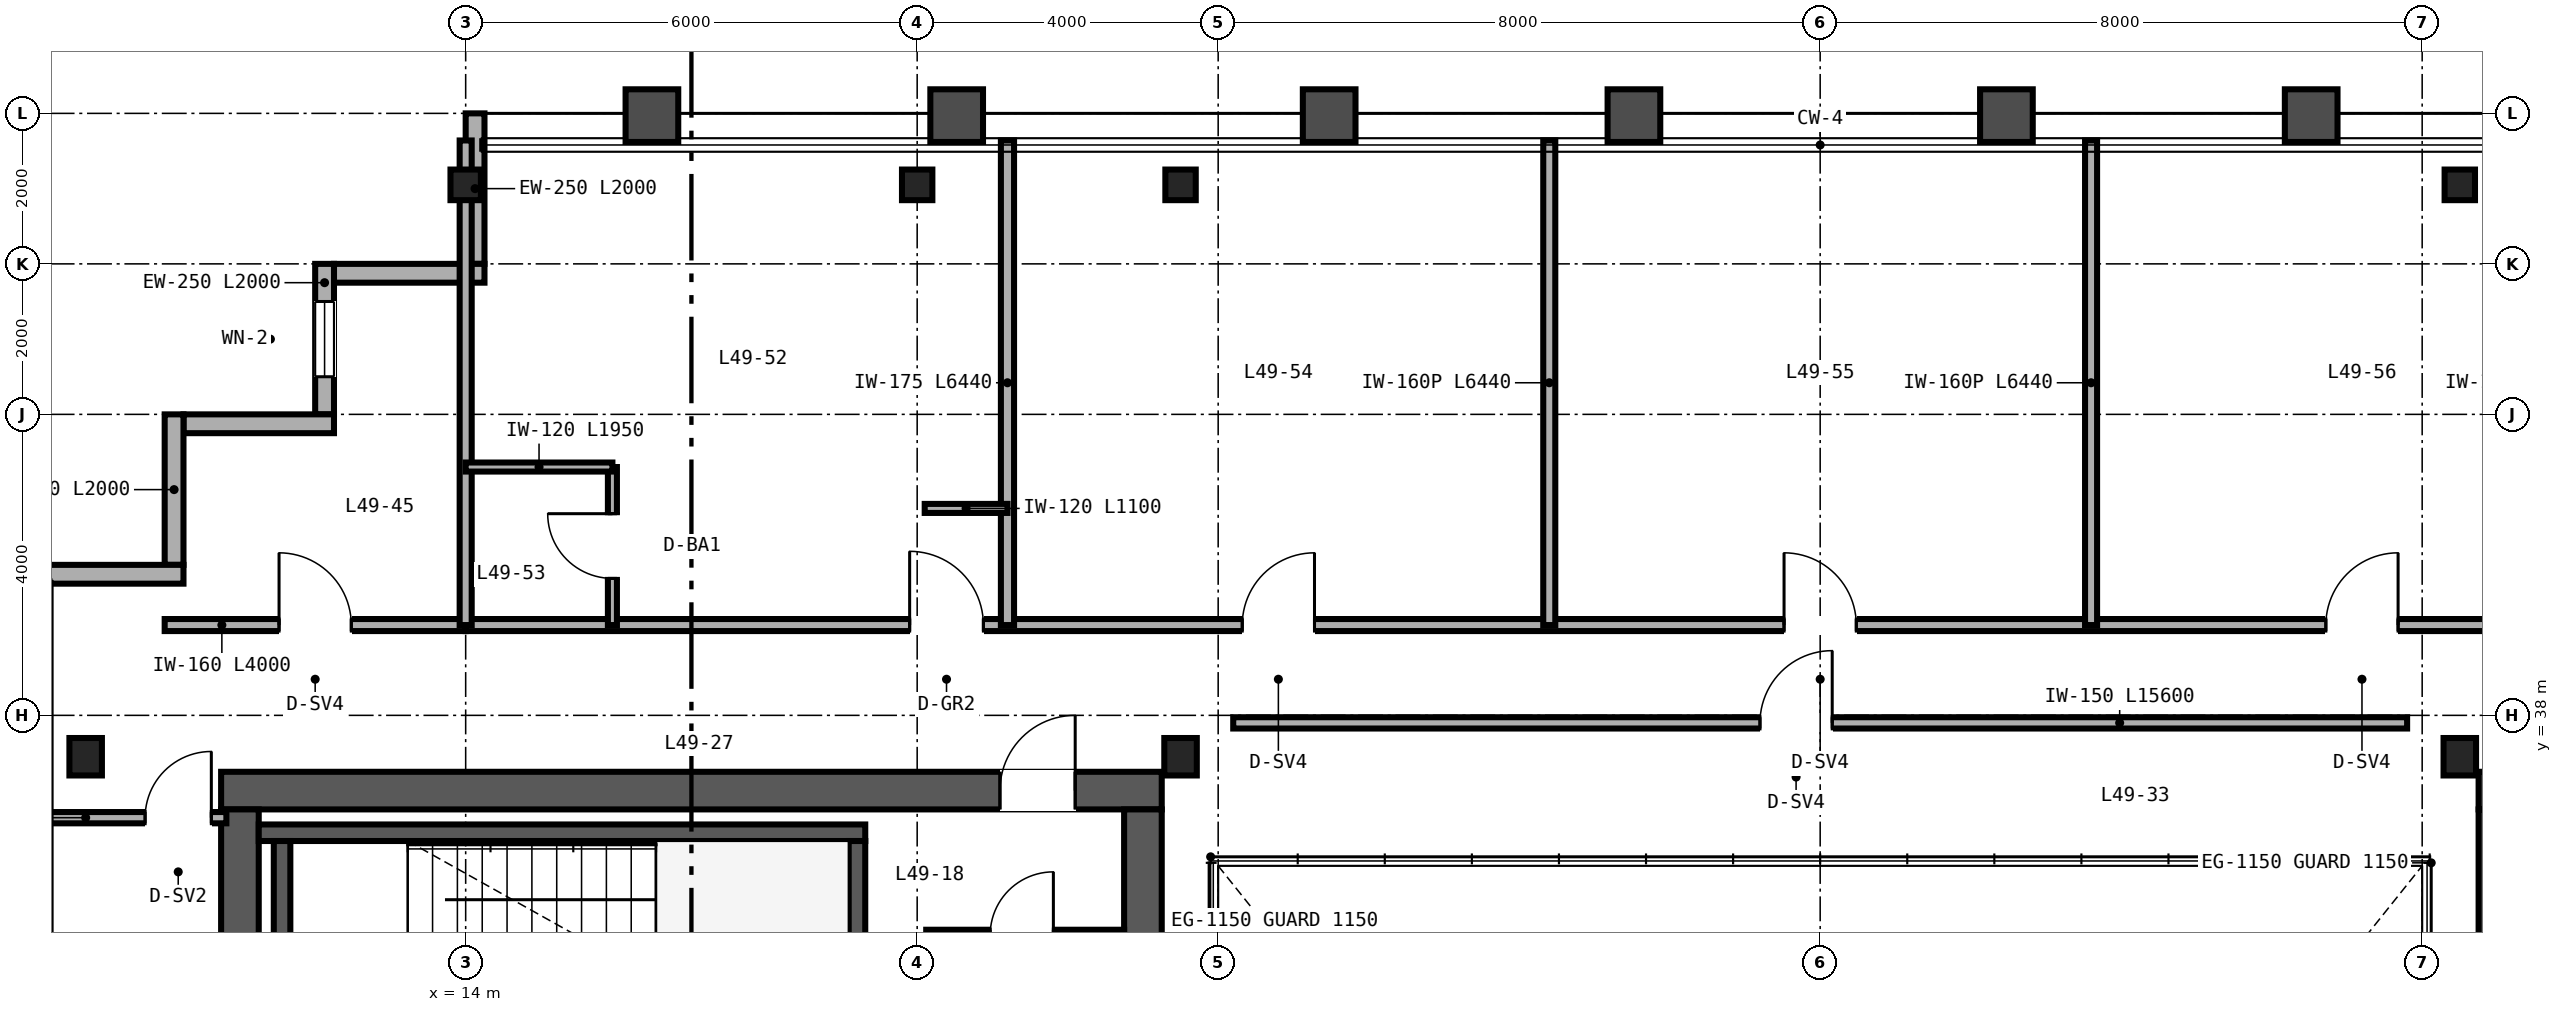
"""IFC4 building model, lengths in metres.
Left out: names, types, materials, properties, quantities, classifications, styles, units other than length and angle.
Written with IfcOpenShell. Run it as: python <this file> out.ifc"""

import sys

from ifc_helpers import new_model, si_unit, direction, frame, frame_2d, origin, origin_2d, place, context, subcontext, project, spatial, rectangle, i_section, extrude, source, transform, mapped, element, fill, save


model = new_model("IFC4")
c1 = context("Model", 3, precision=1e-05, world=origin(), true_north=direction((0.0, 1.0)))
c2 = subcontext(c1, "Body", "Model", "MODEL_VIEW")
j1 = project(units=[si_unit("LENGTHUNIT", "METRE"), si_unit("PLANEANGLEUNIT", "RADIAN")], contexts=[c1])
p1 = place(None, origin())
s1 = spatial("IfcSite", under=j1, at=p1, CompositionType="ELEMENT")
p2 = place(p1, origin())
s2 = spatial("IfcBuilding", under=s1, at=p2, CompositionType="ELEMENT")
p3 = place(p2, frame((0.0, 0.0, 195.6)))
s3 = spatial("IfcBuildingStorey", under=s2, at=p3, CompositionType="ELEMENT", Elevation=195.6)
p4 = place(p3, frame((10.75, 37.0, 0.0), z_axis=(0.0, 0.0, 1.0), x_axis=(1.0, 0.0, 0.0)))
e1 = element("IfcWall", 1, at=p4, inside=s3, PredefinedType="SHEAR", context=c2, shape_type="SweptSolid", body=[
    extrude(rectangle(XDim=12.5, YDim=0.5, at=frame_2d((6.25, 0.0))), origin(), (0.0, 0.0, 1.0), 3.37),
])
p5 = place(p4, frame((10.35, 0.0, 0.0)))
e2 = element("IfcOpeningElement", 2, at=p5, cuts=e1, PredefinedType="OPENING", context=c2, shape_type="SweptSolid", body=[
    extrude(rectangle(XDim=1.0, YDim=2.15, at=frame_2d((0.5, 1.075))), frame((0.0, 0.26, 0.0), z_axis=(0.0, -1.0, 0.0), x_axis=(1.0, 0.0, 0.0)), (0.0, 0.0, 1.0), 0.52),
])
for number, where, z_axis, x_axis in (
    (3, (11.0, 15.25, 0.0), (0.0, 0.0, 1.0), (0.0, 1.0, 0.0)),
    (4, (23.0, 15.25, 0.0), (0.0, 0.0, 1.0), (0.0, 1.0, 0.0)),
):
    element("IfcWall", number, at=place(p3, frame(where, z_axis=z_axis, x_axis=x_axis)), inside=s3, PredefinedType="SHEAR", context=c2, shape_type="SweptSolid", body=[
        extrude(rectangle(XDim=21.5, YDim=0.5, at=frame_2d((10.75, 0.0))), origin(), (0.0, 0.0, 1.0), 3.37),
    ])
p6 = place(p3, frame((40.75, 37.0, 0.0), z_axis=(0.0, 0.0, 1.0), x_axis=(1.0, 0.0, 0.0)))
e5 = element("IfcWall", 5, at=p6, inside=s3, PredefinedType="SHEAR", context=c2, shape_type="SweptSolid", body=[
    extrude(rectangle(XDim=12.5, YDim=0.5, at=frame_2d((6.25, 0.0))), origin(), (0.0, 0.0, 1.0), 3.37),
])
p7 = place(p6, frame((9.95, 0.0, 0.0)))
e6 = element("IfcOpeningElement", 6, at=p7, cuts=e5, PredefinedType="OPENING", context=c2, shape_type="SweptSolid", body=[
    extrude(rectangle(XDim=1.1, YDim=2.15, at=frame_2d((0.55, 1.075))), frame((0.0, 0.26, 0.0), z_axis=(0.0, -1.0, 0.0), x_axis=(1.0, 0.0, 0.0)), (0.0, 0.0, 1.0), 0.52),
])
p8 = place(p3, frame((41.0, 15.25, 0.0), z_axis=(0.0, 0.0, 1.0), x_axis=(0.0, 1.0, 0.0)))
e7 = element("IfcWall", 7, at=p8, inside=s3, PredefinedType="SHEAR", context=c2, shape_type="SweptSolid", body=[
    extrude(rectangle(XDim=21.5, YDim=0.5, at=frame_2d((10.75, 0.0))), origin(), (0.0, 0.0, 1.0), 3.37),
])
p9 = place(p3, frame((11.25, 36.44, 0.0), z_axis=(0.0, 0.0, 1.0), x_axis=(1.0, 0.0, 0.0)))
e8 = element("IfcWall", 8, at=p9, inside=s3, PredefinedType="SHEAR", context=c2, shape_type="SweptSolid", body=[
    extrude(rectangle(XDim=8.06, YDim=0.22, at=frame_2d((4.03, 0.0))), origin(), (0.0, 0.0, 1.0), 3.4),
])
for number, where, z_axis, x_axis in (
    (9, (11.56, 33.05, 0.0), (0.0, 0.0, 1.0), (0.0, 1.0, 0.0)),
    (10, (19.2, 33.05, 0.0), (0.0, 0.0, 1.0), (0.0, 1.0, 0.0)),
):
    element("IfcWall", number, at=place(p3, frame(where, z_axis=z_axis, x_axis=x_axis)), inside=s3, PredefinedType="SHEAR", context=c2, shape_type="SweptSolid", body=[
        extrude(rectangle(XDim=3.28, YDim=0.22, at=frame_2d((1.64, 0.0))), origin(), (0.0, 0.0, 1.0), 3.4),
    ])
m1 = source(origin(), c2, "Body", "SweptSolid", [
    extrude(i_section(OverallWidth=0.432, OverallDepth=0.498, WebThickness=0.056, FlangeThickness=0.089, FilletRadius=0.025, at=origin_2d()), origin(), (0.0, 0.0, 1.0), 3.37),
])
for number, where, z_axis, x_axis in (
    (11, (8.95, 37.45, 0.0), (0.0, 0.0, 1.0), (1.0, 0.0, 0.0)),
    (12, (23.5, 37.45, 0.0), (0.0, 0.0, 1.0), (1.0, 0.0, 0.0)),
    (13, (40.5, 37.45, 0.0), (0.0, 0.0, 1.0), (1.0, 0.0, 0.0)),
):
    element("IfcColumn", number, at=place(p3, frame(where, z_axis=z_axis, x_axis=x_axis)), inside=s3, PredefinedType="COLUMN", context=c2, shape_type="MappedRepresentation", body=[
        mapped(m1, transform((0.0, 0.0, 0.0), scale=1.0)),
    ])
m2 = source(origin(), c2, "Body", "SweptSolid", [
    extrude(i_section(OverallWidth=0.404, OverallDepth=0.407, WebThickness=0.027, FlangeThickness=0.044, FilletRadius=0.025, at=origin_2d()), origin(), (0.0, 0.0, 1.0), 3.37),
])
for number, where, z_axis, x_axis in (
    (14, (14.0, 45.05, 0.0), (0.0, 0.0, 1.0), (1.0, 0.0, 0.0)),
    (15, (20.0, 45.05, 0.0), (0.0, 0.0, 1.0), (1.0, 0.0, 0.0)),
    (16, (23.5, 45.05, 0.0), (0.0, 0.0, 1.0), (1.0, 0.0, 0.0)),
    (17, (40.5, 45.05, 0.0), (0.0, 0.0, 1.0), (1.0, 0.0, 0.0)),
):
    element("IfcColumn", number, at=place(p3, frame(where, z_axis=z_axis, x_axis=x_axis)), inside=s3, PredefinedType="COLUMN", context=c2, shape_type="MappedRepresentation", body=[
        mapped(m2, transform((0.0, 0.0, 0.0), scale=1.0)),
    ])
p10 = place(p3, frame((14.125, 46.0, 0.0), z_axis=(0.0, 0.0, 1.0), x_axis=(0.0, -1.0, 0.0)))
e18 = element("IfcWall", 18, at=p10, inside=s3, PredefinedType="SOLIDWALL", context=c2, shape_type="SweptSolid", body=[
    extrude(rectangle(XDim=2.0, YDim=0.25, at=frame_2d((1.0, 0.0))), origin(), (0.0, 0.0, 1.0), 2.677),
])
p11 = place(p3, frame((14.25, 43.875, 0.0), z_axis=(0.0, 0.0, 1.0), x_axis=(-1.0, 0.0, 0.0)))
e19 = element("IfcWall", 19, at=p11, inside=s3, PredefinedType="SOLIDWALL", context=c2, shape_type="SweptSolid", body=[
    extrude(rectangle(XDim=2.0, YDim=0.25, at=frame_2d((1.0, 0.0))), origin(), (0.0, 0.0, 1.0), 3.37),
])
p12 = place(p3, frame((12.125, 44.0, 0.0), z_axis=(0.0, 0.0, 1.0), x_axis=(0.0, -1.0, 0.0)))
e20 = element("IfcWall", 20, at=p12, inside=s3, PredefinedType="SOLIDWALL", context=c2, shape_type="SweptSolid", body=[
    extrude(rectangle(XDim=2.0, YDim=0.25, at=frame_2d((1.0, 0.0))), origin(), (0.0, 0.0, 1.0), 3.37),
])
p13 = place(p12, frame((0.5, 0.0, 0.85)))
e21 = element("IfcOpeningElement", 21, at=p13, cuts=e20, PredefinedType="OPENING", context=c2, shape_type="SweptSolid", body=[
    extrude(rectangle(XDim=1.0, YDim=1.9, at=frame_2d((0.5, 0.95))), frame((0.0, 0.135, 0.0), z_axis=(0.0, -1.0, 0.0), x_axis=(1.0, 0.0, 0.0)), (0.0, 0.0, 1.0), 0.27),
])
for number, where, z_axis, x_axis in (
    (22, (12.25, 41.875, 0.0), (0.0, 0.0, 1.0), (-1.0, 0.0, 0.0)),
    (23, (10.125, 42.0, 0.0), (0.0, 0.0, 1.0), (0.0, -1.0, 0.0)),
):
    element("IfcWall", number, at=place(p3, frame(where, z_axis=z_axis, x_axis=x_axis)), inside=s3, PredefinedType="SOLIDWALL", context=c2, shape_type="SweptSolid", body=[
        extrude(rectangle(XDim=2.0, YDim=0.25, at=frame_2d((1.0, 0.0))), origin(), (0.0, 0.0, 1.0), 3.37),
    ])
p14 = place(p3, frame((10.25, 39.875, 0.0), z_axis=(0.0, 0.0, 1.0), x_axis=(-1.0, 0.0, 0.0)))
e24 = element("IfcWall", 24, at=p14, inside=s3, PredefinedType="SOLIDWALL", context=c2, shape_type="SweptSolid", body=[
    extrude(rectangle(XDim=2.25, YDim=0.25, at=frame_2d((1.125, 0.0))), origin(), (0.0, 0.0, 1.0), 3.37),
])
p15 = place(p3, frame((20.12, 35.08, 0.0), z_axis=(0.0, 0.0, 1.0), x_axis=(1.0, 0.0, 0.0)))
e25 = element("IfcWall", 25, at=p15, inside=s3, PredefinedType="PARTITIONING", context=c2, shape_type="SweptSolid", body=[
    extrude(rectangle(XDim=2.63, YDim=0.142, at=frame_2d((1.315, 0.0))), origin(), (0.0, 0.0, 1.0), 3.37),
])
p16 = place(p15, frame((0.85, 0.0, 0.0)))
e26 = element("IfcOpeningElement", 26, at=p16, cuts=e25, PredefinedType="OPENING", context=c2, shape_type="SweptSolid", body=[
    extrude(rectangle(XDim=0.84, YDim=2.1, at=frame_2d((0.42, 1.05))), frame((0.0, 0.081, 0.0), z_axis=(0.0, -1.0, 0.0), x_axis=(1.0, 0.0, 0.0)), (0.0, 0.0, 1.0), 0.162),
])
p17 = place(p3, frame((24.2, 37.9, 0.0), z_axis=(0.0, 0.0, 1.0), x_axis=(1.0, 0.0, 0.0)))
e27 = element("IfcWall", 27, at=p17, inside=s3, PredefinedType="PARTITIONING", context=c2, shape_type="SweptSolid", body=[
    extrude(rectangle(XDim=15.6, YDim=0.15, at=frame_2d((7.8, 0.0))), origin(), (0.0, 0.0, 1.0), 3.37),
])
p18 = place(p17, frame((7.0, 0.0, 0.0)))
e28 = element("IfcOpeningElement", 28, at=p18, cuts=e27, PredefinedType="OPENING", context=c2, shape_type="SweptSolid", body=[
    extrude(rectangle(XDim=0.96, YDim=2.15, at=frame_2d((0.48, 1.075))), frame((0.0, 0.085, 0.0), z_axis=(0.0, -1.0, 0.0), x_axis=(1.0, 0.0, 0.0)), (0.0, 0.0, 1.0), 0.17),
])
p19 = place(p3, frame((8.16, 36.64, 0.0), z_axis=(0.0, 0.0, 1.0), x_axis=(1.0, 0.0, 0.0)))
e29 = element("IfcWall", 29, at=p19, inside=s3, PredefinedType="PARTITIONING", context=c2, shape_type="SweptSolid", body=[
    extrude(rectangle(XDim=2.66, YDim=0.15, at=frame_2d((1.33, 0.0))), origin(), (0.0, 0.0, 1.0), 2.753),
])
p20 = place(p19, frame((1.58, 0.0, 0.0)))
e30 = element("IfcOpeningElement", 30, at=p20, cuts=e29, PredefinedType="OPENING", context=c2, shape_type="SweptSolid", body=[
    extrude(rectangle(XDim=0.88, YDim=2.15, at=frame_2d((0.44, 1.075))), frame((0.0, 0.085, 0.0), z_axis=(0.0, -1.0, 0.0), x_axis=(1.0, 0.0, 0.0)), (0.0, 0.0, 1.0), 0.17),
])
p21 = place(p3, frame((10.0, 39.2, 0.0), z_axis=(0.0, 0.0, 1.0), x_axis=(1.0, 0.0, 0.0)))
e31 = element("IfcWall", 31, at=p21, inside=s3, PredefinedType="PARTITIONING", context=c2, shape_type="SweptSolid", body=[
    extrude(rectangle(XDim=4.0, YDim=0.16, at=frame_2d((2.0, 0.0))), origin(), (0.0, 0.0, 1.0), 3.37),
])
p22 = place(p21, frame((1.52, 0.0, 0.0)))
e32 = element("IfcOpeningElement", 32, at=p22, cuts=e31, PredefinedType="OPENING", context=c2, shape_type="SweptSolid", body=[
    extrude(rectangle(XDim=0.96, YDim=2.15, at=frame_2d((0.48, 1.075))), frame((0.0, 0.09, 0.0), z_axis=(0.0, -1.0, 0.0), x_axis=(1.0, 0.0, 0.0)), (0.0, 0.0, 1.0), 0.18),
])
p23 = place(p3, frame((14.0, 39.2, 0.0), z_axis=(0.0, 0.0, 1.0), x_axis=(1.0, 0.0, 0.0)))
e33 = element("IfcWall", 33, at=p23, inside=s3, PredefinedType="PARTITIONING", context=c2, shape_type="SweptSolid", body=[
    extrude(rectangle(XDim=36.0, YDim=0.16, at=frame_2d((18.0, 0.0))), origin(), (0.0, 0.0, 1.0), 2.913),
])
p24 = place(p23, frame((5.9, 0.0, 0.0)))
e34 = element("IfcOpeningElement", 34, at=p24, cuts=e33, PredefinedType="OPENING", context=c2, shape_type="SweptSolid", body=[
    extrude(rectangle(XDim=0.98, YDim=2.2, at=frame_2d((0.49, 1.1))), frame((0.0, 0.09, 0.0), z_axis=(0.0, -1.0, 0.0), x_axis=(1.0, 0.0, 0.0)), (0.0, 0.0, 1.0), 0.18),
])
p25 = place(p23, frame((10.32, 0.0, 0.0)))
e35 = element("IfcOpeningElement", 35, at=p25, cuts=e33, PredefinedType="OPENING", context=c2, shape_type="SweptSolid", body=[
    extrude(rectangle(XDim=0.96, YDim=2.15, at=frame_2d((0.48, 1.075))), frame((0.0, 0.09, 0.0), z_axis=(0.0, -1.0, 0.0), x_axis=(1.0, 0.0, 0.0)), (0.0, 0.0, 1.0), 0.18),
])
p26 = place(p23, frame((17.52, 0.0, 0.0)))
e36 = element("IfcOpeningElement", 36, at=p26, cuts=e33, PredefinedType="OPENING", context=c2, shape_type="SweptSolid", body=[
    extrude(rectangle(XDim=0.96, YDim=2.15, at=frame_2d((0.48, 1.075))), frame((0.0, 0.09, 0.0), z_axis=(0.0, -1.0, 0.0), x_axis=(1.0, 0.0, 0.0)), (0.0, 0.0, 1.0), 0.18),
])
p27 = place(p23, frame((24.72, 0.0, 0.0)))
e37 = element("IfcOpeningElement", 37, at=p27, cuts=e33, PredefinedType="OPENING", context=c2, shape_type="SweptSolid", body=[
    extrude(rectangle(XDim=0.96, YDim=2.15, at=frame_2d((0.48, 1.075))), frame((0.0, 0.09, 0.0), z_axis=(0.0, -1.0, 0.0), x_axis=(1.0, 0.0, 0.0)), (0.0, 0.0, 1.0), 0.18),
])
p28 = place(p23, frame((34.7, 0.0, 0.0)))
e38 = element("IfcOpeningElement", 38, at=p28, cuts=e33, PredefinedType="OPENING", context=c2, shape_type="SweptSolid", body=[
    extrude(rectangle(XDim=0.98, YDim=2.2, at=frame_2d((0.49, 1.1))), frame((0.0, 0.09, 0.0), z_axis=(0.0, -1.0, 0.0), x_axis=(1.0, 0.0, 0.0)), (0.0, 0.0, 1.0), 0.18),
])
p29 = place(p3, frame((14.0, 39.2, 0.0), z_axis=(0.0, 0.0, 1.0), x_axis=(0.0, 1.0, 0.0)))
e39 = element("IfcWall", 39, at=p29, inside=s3, PredefinedType="PARTITIONING", context=c2, shape_type="SweptSolid", body=[
    extrude(rectangle(XDim=6.44, YDim=0.16, at=frame_2d((3.22, 0.0))), origin(), (0.0, 0.0, 1.0), 2.677),
])
p30 = place(p3, frame((21.2, 39.2, 0.0), z_axis=(0.0, 0.0, 1.0), x_axis=(0.0, 1.0, 0.0)))
e40 = element("IfcWall", 40, at=p30, inside=s3, PredefinedType="PARTITIONING", context=c2, shape_type="SweptSolid", body=[
    extrude(rectangle(XDim=6.44, YDim=0.175, at=frame_2d((3.22, 0.0))), origin(), (0.0, 0.0, 1.0), 2.833),
])
p31 = place(p3, frame((15.95, 39.2, 0.0), z_axis=(0.0, 0.0, 1.0), x_axis=(0.0, 1.0, 0.0)))
e41 = element("IfcWall", 41, at=p31, inside=s3, PredefinedType="PARTITIONING", context=c2, shape_type="SweptSolid", body=[
    extrude(rectangle(XDim=2.1, YDim=0.12, at=frame_2d((1.05, 0.0))), origin(), (0.0, 0.0, 1.0), 3.37),
])
p32 = place(p31, frame((0.62, 0.0, 0.0)))
e42 = element("IfcOpeningElement", 42, at=p32, cuts=e41, PredefinedType="OPENING", context=c2, shape_type="SweptSolid", body=[
    extrude(rectangle(XDim=0.86, YDim=2.1, at=frame_2d((0.43, 1.05))), frame((0.0, 0.07, 0.0), z_axis=(0.0, -1.0, 0.0), x_axis=(1.0, 0.0, 0.0)), (0.0, 0.0, 1.0), 0.14),
])
p33 = place(p3, frame((14.0, 41.3, 0.0), z_axis=(0.0, 0.0, 1.0), x_axis=(1.0, 0.0, 0.0)))
e43 = element("IfcWall", 43, at=p33, inside=s3, PredefinedType="PARTITIONING", context=c2, shape_type="SweptSolid", body=[
    extrude(rectangle(XDim=1.95, YDim=0.12, at=frame_2d((0.975, 0.0))), origin(), (0.0, 0.0, 1.0), 3.37),
])
p34 = place(p3, frame((20.1, 40.75, 0.0), z_axis=(0.0, 0.0, 1.0), x_axis=(1.0, 0.0, 0.0)))
e44 = element("IfcWall", 44, at=p34, inside=s3, PredefinedType="PARTITIONING", context=c2, shape_type="SweptSolid", body=[
    extrude(rectangle(XDim=1.1, YDim=0.12, at=frame_2d((0.55, 0.0))), origin(), (0.0, 0.0, 1.0), 3.37),
])
for number, where, z_axis, x_axis in (
    (45, (28.4, 39.2, 0.0), (0.0, 0.0, 1.0), (0.0, 1.0, 0.0)),
    (46, (35.6, 39.2, 0.0), (0.0, 0.0, 1.0), (0.0, 1.0, 0.0)),
):
    element("IfcWall", number, at=place(p3, frame(where, z_axis=z_axis, x_axis=x_axis)), inside=s3, PredefinedType="PARTITIONING", context=c2, shape_type="SweptSolid", body=[
        extrude(rectangle(XDim=6.44, YDim=0.16, at=frame_2d((3.22, 0.0))), origin(), (0.0, 0.0, 1.0), 2.443),
    ])
m3 = source(origin(), c2, "Body", "SweptSolid", [
    extrude(rectangle(XDim=1.0, YDim=1.9, at=frame_2d((0.5, 0.95))), frame((0.0, 0.03, 0.0), z_axis=(0.0, -1.0, 0.0), x_axis=(1.0, 0.0, 0.0)), (0.0, 0.0, 1.0), 0.06),
])
p35 = place(p13, origin())
e47 = element("IfcWindow", 47, at=p35, inside=s3, PartitioningType="SINGLE_PANEL", PredefinedType="WINDOW", context=c2, shape_type="MappedRepresentation", body=[
    mapped(m3, transform((0.0, 0.0, 0.0), scale=1.0)),
])
fill(e21, e47)
m4 = source(origin(), c2, "Body", "SweptSolid", [
    extrude(rectangle(XDim=1.0, YDim=2.15, at=frame_2d((0.5, 1.075))), frame((0.0, 0.025, 0.0), z_axis=(0.0, -1.0, 0.0), x_axis=(1.0, 0.0, 0.0)), (0.0, 0.0, 1.0), 0.05),
])
p36 = place(p5, origin())
e48 = element("IfcDoor", 48, at=p36, inside=s3, OperationType="SINGLE_SWING_RIGHT", PredefinedType="DOOR", context=c2, shape_type="MappedRepresentation", body=[
    mapped(m4, transform((0.0, 0.0, 0.0), scale=1.0)),
])
fill(e2, e48)
m5 = source(origin(), c2, "Body", "SweptSolid", [
    extrude(rectangle(XDim=0.96, YDim=2.15, at=frame_2d((0.48, 1.075))), frame((0.0, 0.025, 0.0), z_axis=(0.0, -1.0, 0.0), x_axis=(1.0, 0.0, 0.0)), (0.0, 0.0, 1.0), 0.05),
])
p37 = place(p18, origin())
e49 = element("IfcDoor", 49, at=p37, inside=s3, OperationType="SINGLE_SWING_RIGHT", PredefinedType="DOOR", context=c2, shape_type="MappedRepresentation", body=[
    mapped(m5, transform((0.0, 0.0, 0.0), scale=1.0)),
])
fill(e28, e49)
m6 = source(origin(), c2, "Body", "SweptSolid", [
    extrude(rectangle(XDim=0.88, YDim=2.15, at=frame_2d((0.44, 1.075))), frame((0.0, 0.025, 0.0), z_axis=(0.0, -1.0, 0.0), x_axis=(1.0, 0.0, 0.0)), (0.0, 0.0, 1.0), 0.05),
])
p38 = place(p20, origin())
e50 = element("IfcDoor", 50, at=p38, inside=s3, OperationType="SINGLE_SWING_RIGHT", PredefinedType="DOOR", context=c2, shape_type="MappedRepresentation", body=[
    mapped(m6, transform((0.0, 0.0, 0.0), scale=1.0)),
])
fill(e30, e50)
p39 = place(p22, origin())
e51 = element("IfcDoor", 51, at=p39, inside=s3, OperationType="SINGLE_SWING_LEFT", PredefinedType="DOOR", context=c2, shape_type="MappedRepresentation", body=[
    mapped(m5, transform((0.0, 0.0, 0.0), scale=1.0)),
])
fill(e32, e51)
m7 = source(origin(), c2, "Body", "SweptSolid", [
    extrude(rectangle(XDim=0.86, YDim=2.1, at=frame_2d((0.43, 1.05))), frame((0.0, 0.025, 0.0), z_axis=(0.0, -1.0, 0.0), x_axis=(1.0, 0.0, 0.0)), (0.0, 0.0, 1.0), 0.05),
])
p40 = place(p32, origin())
e52 = element("IfcDoor", 52, at=p40, inside=s3, OperationType="SINGLE_SWING_RIGHT", PredefinedType="DOOR", context=c2, shape_type="MappedRepresentation", body=[
    mapped(m7, transform((0.0, 0.0, 0.0), scale=1.0)),
])
fill(e42, e52)
m8 = source(origin(), c2, "Body", "SweptSolid", [
    extrude(rectangle(XDim=0.98, YDim=2.2, at=frame_2d((0.49, 1.1))), frame((0.0, 0.025, 0.0), z_axis=(0.0, -1.0, 0.0), x_axis=(1.0, 0.0, 0.0)), (0.0, 0.0, 1.0), 0.05),
])
p41 = place(p24, origin())
e53 = element("IfcDoor", 53, at=p41, inside=s3, OperationType="SINGLE_SWING_LEFT", PredefinedType="DOOR", context=c2, shape_type="MappedRepresentation", body=[
    mapped(m8, transform((0.0, 0.0, 0.0), scale=1.0)),
])
fill(e34, e53)
p42 = place(p25, origin())
e54 = element("IfcDoor", 54, at=p42, inside=s3, OperationType="SINGLE_SWING_RIGHT", PredefinedType="DOOR", context=c2, shape_type="MappedRepresentation", body=[
    mapped(m5, transform((0.0, 0.0, 0.0), scale=1.0)),
])
fill(e35, e54)
p43 = place(p26, origin())
e55 = element("IfcDoor", 55, at=p43, inside=s3, OperationType="SINGLE_SWING_LEFT", PredefinedType="DOOR", context=c2, shape_type="MappedRepresentation", body=[
    mapped(m5, transform((0.0, 0.0, 0.0), scale=1.0)),
])
fill(e36, e55)
p44 = place(p27, origin())
e56 = element("IfcDoor", 56, at=p44, inside=s3, OperationType="SINGLE_SWING_RIGHT", PredefinedType="DOOR", context=c2, shape_type="MappedRepresentation", body=[
    mapped(m5, transform((0.0, 0.0, 0.0), scale=1.0)),
])
fill(e37, e56)
save(model, sys.argv[1])
